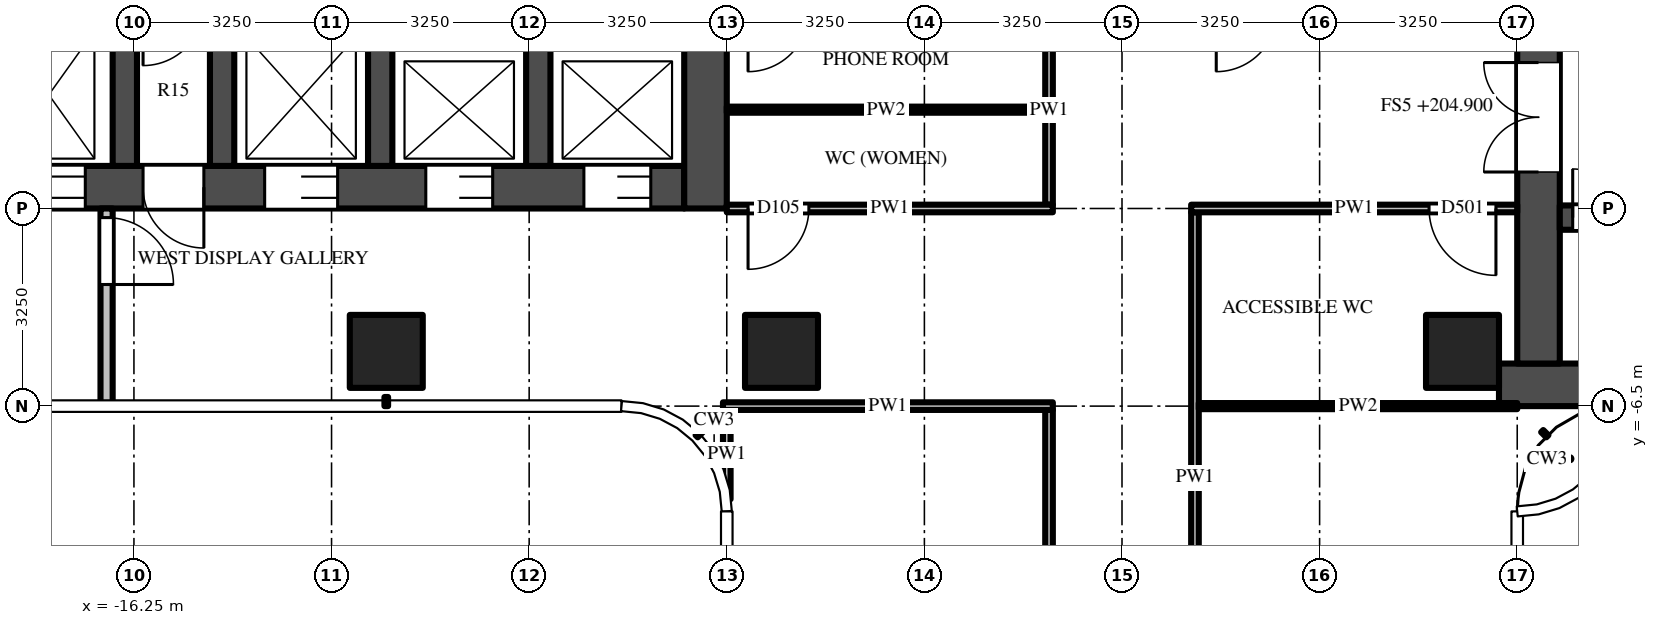
"""IFC4 building model, lengths in metres.
Left out: names, types, materials, properties, quantities, classifications, styles, units other than length and angle.
Written with IfcOpenShell. Run it as: python <this file> out.ifc"""

import sys

from ifc_helpers import new_model, si_unit, direction, frame, frame_2d, origin, origin_2d, place, context, subcontext, project, spatial, rectangle, extrude, source, transform, mapped, element, fill, save


model = new_model("IFC4")
c1 = context("Model", 3, precision=1e-05, world=origin(), true_north=direction((0.0, 1.0)))
c2 = subcontext(c1, "Body", "Model", "MODEL_VIEW")
j1 = project(units=[si_unit("LENGTHUNIT", "METRE"), si_unit("PLANEANGLEUNIT", "RADIAN")], contexts=[c1])
p1 = place(None, origin())
s1 = spatial("IfcSite", under=j1, at=p1, CompositionType="ELEMENT")
p2 = place(p1, origin())
s2 = spatial("IfcBuilding", under=s1, at=p2, CompositionType="ELEMENT")
p3 = place(p2, frame((0.0, 0.0, 204.9)))
s3 = spatial("IfcBuildingStorey", under=s2, at=p3, CompositionType="ELEMENT", Elevation=204.9)
m1 = source(origin(), c2, "Body", "SweptSolid", [
    extrude(rectangle(XDim=1.2, YDim=1.2, at=origin_2d()), origin(), (0.0, 0.0, 1.0), 3.9),
])
for number, where, z_axis, x_axis in (
    (1, (5.6, -5.6, 0.0), (0.0, 0.0, 1.0), (1.0, 0.0, 0.0)),
    (2, (-5.6, -5.6, 0.0), (0.0, 0.0, 1.0), (1.0, 0.0, 0.0)),
    (3, (-12.1, -5.6, 0.0), (0.0, 0.0, 1.0), (1.0, 0.0, 0.0)),
):
    element("IfcColumn", number, at=place(p3, frame(where, z_axis=z_axis, x_axis=x_axis)), inside=s3, PredefinedType="COLUMN", context=c2, shape_type="MappedRepresentation", body=[
        mapped(m1, transform((0.0, 0.0, 0.0))),
    ])
m2 = source(origin(), c2, "Body", "SweptSolid", [
    extrude(rectangle(XDim=16.55, YDim=0.7, at=frame_2d((8.275, 0.0))), origin(), (0.0, 0.0, 1.0), 3.7),
])
p4 = place(p3, frame((6.2, -6.15, 0.0), z_axis=(0.0, 0.0, 1.0), x_axis=(1.0, 0.0, 0.0)))
e4 = element("IfcWall", 4, at=p4, inside=s3, PredefinedType="SHEAR", context=c2, shape_type="MappedRepresentation", body=[
    mapped(m2, transform((0.0, 0.0, 0.0))),
])
m3 = source(origin(), c2, "Body", "SweptSolid", [
    extrude(rectangle(XDim=9.05, YDim=0.7, at=frame_2d((4.525, 0.0))), origin(), (0.0, 0.0, 1.0), 3.7),
])
p5 = place(p3, frame((6.85, -5.8, 0.0), z_axis=(0.0, 0.0, 1.0), x_axis=(0.0, 1.0, 0.0)))
e5 = element("IfcWall", 5, at=p5, inside=s3, PredefinedType="SHEAR", context=c2, shape_type="MappedRepresentation", body=[
    mapped(m3, transform((0.0, 0.0, 0.0))),
])
m4 = source(origin(), c2, "Body", "SweptSolid", [
    extrude(rectangle(XDim=1.8, YDim=2.1, at=frame_2d((0.9, 1.05))), frame((0.0, 0.36, 0.0), z_axis=(0.0, -1.0, 0.0), x_axis=(1.0, 0.0, 0.0)), (0.0, 0.0, 1.0), 0.72),
])
p6 = place(p5, frame((3.15, 0.0, 0.0)))
e6 = element("IfcOpeningElement", 6, at=p6, cuts=e5, PredefinedType="OPENING", context=c2, shape_type="MappedRepresentation", body=[
    mapped(m4, transform((0.0, 0.0, 0.0))),
])
m5 = source(origin(), c2, "Body", "SweptSolid", [
    extrude(rectangle(XDim=7.5, YDim=0.4, at=frame_2d((3.75, 0.0))), origin(), (0.0, 0.0, 1.0), 3.7),
])
p7 = place(p3, frame((7.2, -3.4, 0.0), z_axis=(0.0, 0.0, 1.0), x_axis=(1.0, 0.0, 0.0)))
e7 = element("IfcWall", 7, at=p7, inside=s3, PredefinedType="SHEAR", context=c2, shape_type="MappedRepresentation", body=[
    mapped(m5, transform((0.0, 0.0, 0.0))),
])
m6 = source(origin(), c2, "Body", "SweptSolid", [
    extrude(rectangle(XDim=0.8, YDim=2.1, at=frame_2d((0.4, 1.05))), frame((0.0, 0.21, 0.0), z_axis=(0.0, -1.0, 0.0), x_axis=(1.0, 0.0, 0.0)), (0.0, 0.0, 1.0), 0.42),
])
p8 = place(p7, frame((0.212, 0.0, 0.0)))
e8 = element("IfcOpeningElement", 8, at=p8, cuts=e7, PredefinedType="OPENING", context=c2, shape_type="MappedRepresentation", body=[
    mapped(m6, transform((0.0, 0.0, 0.0))),
])
m7 = source(origin(), c2, "Body", "SweptSolid", [
    extrude(rectangle(XDim=1.0, YDim=2.1, at=frame_2d((0.5, 1.05))), frame((0.0, 0.21, 0.0), z_axis=(0.0, -1.0, 0.0), x_axis=(1.0, 0.0, 0.0)), (0.0, 0.0, 1.0), 0.42),
])
p9 = place(p7, frame((3.05, 0.0, 0.0)))
e9 = element("IfcOpeningElement", 9, at=p9, cuts=e7, PredefinedType="OPENING", context=c2, shape_type="MappedRepresentation", body=[
    mapped(m7, transform((0.0, 0.0, 0.0))),
])
p10 = place(p7, frame((6.087, 0.0, 0.0)))
e10 = element("IfcOpeningElement", 10, at=p10, cuts=e7, PredefinedType="OPENING", context=c2, shape_type="MappedRepresentation", body=[
    mapped(m6, transform((0.0, 0.0, 0.0))),
])
m8 = source(origin(), c2, "Body", "SweptSolid", [
    extrude(rectangle(XDim=14.85, YDim=0.7, at=frame_2d((7.425, 0.0))), origin(), (0.0, 0.0, 1.0), 3.7),
])
p11 = place(p3, frame((-7.2, -2.9, 0.0), z_axis=(0.0, 0.0, 1.0), x_axis=(-1.0, 0.0, 0.0)))
e11 = element("IfcWall", 11, at=p11, inside=s3, PredefinedType="SHEAR", context=c2, shape_type="MappedRepresentation", body=[
    mapped(m8, transform((0.0, 0.0, 0.0))),
])
m9 = source(origin(), c2, "Body", "SweptSolid", [
    extrude(rectangle(XDim=1.1, YDim=2.1, at=frame_2d((0.55, 1.05))), frame((0.0, 0.36, 0.0), z_axis=(0.0, -1.0, 0.0), x_axis=(1.0, 0.0, 0.0)), (0.0, 0.0, 1.0), 0.72),
])
p12 = place(p11, frame((0.55, 0.0, 0.0)))
e12 = element("IfcOpeningElement", 12, at=p12, cuts=e11, PredefinedType="OPENING", context=c2, shape_type="MappedRepresentation", body=[
    mapped(m9, transform((0.0, 0.0, 0.0))),
])
p13 = place(p11, frame((3.15, 0.0, 0.0)))
e13 = element("IfcOpeningElement", 13, at=p13, cuts=e11, PredefinedType="OPENING", context=c2, shape_type="MappedRepresentation", body=[
    mapped(m9, transform((0.0, 0.0, 0.0))),
])
m10 = source(origin(), c2, "Body", "SweptSolid", [
    extrude(rectangle(XDim=1.2, YDim=2.1, at=frame_2d((0.6, 1.05))), frame((0.0, 0.36, 0.0), z_axis=(0.0, -1.0, 0.0), x_axis=(1.0, 0.0, 0.0)), (0.0, 0.0, 1.0), 0.72),
])
p14 = place(p11, frame((5.7, 0.0, 0.0)))
e14 = element("IfcOpeningElement", 14, at=p14, cuts=e11, PredefinedType="OPENING", context=c2, shape_type="MappedRepresentation", body=[
    mapped(m10, transform((0.0, 0.0, 0.0))),
])
m11 = source(origin(), c2, "Body", "SweptSolid", [
    extrude(rectangle(XDim=1.3, YDim=2.1, at=frame_2d((0.65, 1.05))), frame((0.0, 0.36, 0.0), z_axis=(0.0, -1.0, 0.0), x_axis=(1.0, 0.0, 0.0)), (0.0, 0.0, 1.0), 0.72),
])
p15 = place(p11, frame((12.2, 0.0, 0.0)))
e15 = element("IfcOpeningElement", 15, at=p15, cuts=e11, PredefinedType="OPENING", context=c2, shape_type="MappedRepresentation", body=[
    mapped(m11, transform((0.0, 0.0, 0.0))),
])
p16 = place(p11, frame((9.85, 0.0, 0.0)))
e16 = element("IfcOpeningElement", 16, at=p16, cuts=e11, PredefinedType="OPENING", context=c2, shape_type="MappedRepresentation", body=[
    mapped(m10, transform((0.0, 0.0, 0.0))),
])
m12 = source(origin(), c2, "Body", "SweptSolid", [
    extrude(rectangle(XDim=1.0, YDim=2.1, at=frame_2d((0.5, 1.05))), frame((0.0, 0.36, 0.0), z_axis=(0.0, -1.0, 0.0), x_axis=(1.0, 0.0, 0.0)), (0.0, 0.0, 1.0), 0.72),
])
p17 = place(p11, frame((7.9, 0.0, 0.0)))
e17 = element("IfcOpeningElement", 17, at=p17, cuts=e11, PredefinedType="OPENING", context=c2, shape_type="MappedRepresentation", body=[
    mapped(m12, transform((0.0, 0.0, 0.0))),
])
p18 = place(p3, frame((-6.85, 5.8, 0.0), z_axis=(0.0, 0.0, 1.0), x_axis=(0.0, -1.0, 0.0)))
e18 = element("IfcWall", 18, at=p18, inside=s3, PredefinedType="SHEAR", context=c2, shape_type="MappedRepresentation", body=[
    mapped(m3, transform((0.0, 0.0, 0.0))),
])
p19 = place(p18, frame((3.15, 0.0, 0.0)))
e19 = element("IfcOpeningElement", 19, at=p19, cuts=e18, PredefinedType="OPENING", context=c2, shape_type="MappedRepresentation", body=[
    mapped(m4, transform((0.0, 0.0, 0.0))),
])
m13 = source(origin(), c2, "Body", "SweptSolid", [
    extrude(rectangle(XDim=2.45, YDim=0.4, at=frame_2d((1.225, 0.0))), origin(), (0.0, 0.0, 1.0), 3.7),
])
for number, where, z_axis, x_axis in (
    (20, (-9.6, -0.1, 0.0), (0.0, 0.0, 1.0), (0.0, -1.0, 0.0)),
    (21, (-12.2, -0.1, 0.0), (0.0, 0.0, 1.0), (0.0, -1.0, 0.0)),
    (22, (-14.8, -0.1, 0.0), (0.0, 0.0, 1.0), (0.0, -1.0, 0.0)),
    (23, (-16.4, -0.1, 0.0), (0.0, 0.0, 1.0), (0.0, -1.0, 0.0)),
):
    element("IfcWall", number, at=place(p3, frame(where, z_axis=z_axis, x_axis=x_axis)), inside=s3, PredefinedType="SHEAR", context=c2, shape_type="MappedRepresentation", body=[
        mapped(m13, transform((0.0, 0.0, 0.0))),
    ])
m14 = source(origin(), c2, "Body", "SweptSolid", [
    extrude(rectangle(XDim=3.25, YDim=0.2, at=frame_2d((1.625, 0.0))), origin(), (0.0, 0.0, 1.0), 3.7),
])
p20 = place(p3, frame((-16.7, -3.25, 0.0), z_axis=(0.0, 0.0, 1.0), x_axis=(0.0, -1.0, 0.0)))
e24 = element("IfcWall", 24, at=p20, inside=s3, PredefinedType="PARTITIONING", context=c2, shape_type="MappedRepresentation", body=[
    mapped(m14, transform((0.0, 0.0, 0.0))),
])
m15 = source(origin(), c2, "Body", "SweptSolid", [
    extrude(rectangle(XDim=1.1, YDim=2.1, at=frame_2d((0.55, 1.05))), frame((0.0, 0.11, 0.0), z_axis=(0.0, -1.0, 0.0), x_axis=(1.0, 0.0, 0.0)), (0.0, 0.0, 1.0), 0.22),
])
p21 = place(p20, frame((0.15, 0.0, 0.0)))
e25 = element("IfcOpeningElement", 25, at=p21, cuts=e24, PredefinedType="OPENING", context=c2, shape_type="MappedRepresentation", body=[
    mapped(m15, transform((0.0, 0.0, 0.0))),
])
m16 = source(origin(), c2, "Body", "SweptSolid", [
    extrude(rectangle(XDim=1.469, YDim=0.125, at=frame_2d((0.734, 0.0))), origin(), (0.0, 0.0, 1.0), 3.7),
])
p22 = place(p3, frame((-6.5, -6.562, 0.0), z_axis=(0.0, 0.0, 1.0), x_axis=(0.0, -1.0, 0.0)))
e26 = element("IfcWall", 26, at=p22, inside=s3, PredefinedType="PARTITIONING", context=c2, shape_type="MappedRepresentation", body=[
    mapped(m16, transform((0.0, 0.0, 0.0))),
])
m17 = source(origin(), c2, "Body", "SweptSolid", [
    extrude(rectangle(XDim=3.125, YDim=0.125, at=frame_2d((1.562, 0.0))), origin(), (0.0, 0.0, 1.0), 3.068),
])
p23 = place(p3, frame((-1.2, -0.062, 0.0), z_axis=(0.0, 0.0, 1.0), x_axis=(0.0, -1.0, 0.0)))
e27 = element("IfcWall", 27, at=p23, inside=s3, PredefinedType="PARTITIONING", context=c2, shape_type="MappedRepresentation", body=[
    mapped(m17, transform((0.0, 0.0, 0.0))),
])
m18 = source(origin(), c2, "Body", "SweptSolid", [
    extrude(rectangle(XDim=5.475, YDim=0.125, at=frame_2d((2.738, 0.0))), origin(), (0.0, 0.0, 1.0), 2.997),
])
p24 = place(p3, frame((-1.2, -12.038, 0.0), z_axis=(0.0, 0.0, 1.0), x_axis=(0.0, 1.0, 0.0)))
e28 = element("IfcWall", 28, at=p24, inside=s3, PredefinedType="PARTITIONING", context=c2, shape_type="MappedRepresentation", body=[
    mapped(m18, transform((0.0, 0.0, 0.0))),
])
m19 = source(origin(), c2, "Body", "SweptSolid", [
    extrude(rectangle(XDim=1.2, YDim=2.1, at=frame_2d((0.6, 1.05))), frame((0.0, 0.073, 0.0), z_axis=(0.0, -1.0, 0.0), x_axis=(1.0, 0.0, 0.0)), (0.0, 0.0, 1.0), 0.145),
])
p25 = place(p24, frame((0.288, 0.0, 0.0)))
e29 = element("IfcOpeningElement", 29, at=p25, cuts=e28, PredefinedType="OPENING", context=c2, shape_type="MappedRepresentation", body=[
    mapped(m19, transform((0.0, 0.0, 0.0))),
])
m20 = source(origin(), c2, "Body", "SweptSolid", [
    extrude(rectangle(XDim=8.725, YDim=0.125, at=frame_2d((4.363, 0.0))), origin(), (0.0, 0.0, 1.0), 2.997),
])
p26 = place(p3, frame((1.2, -3.312, 0.0), z_axis=(0.0, 0.0, 1.0), x_axis=(0.0, -1.0, 0.0)))
e30 = element("IfcWall", 30, at=p26, inside=s3, PredefinedType="PARTITIONING", context=c2, shape_type="MappedRepresentation", body=[
    mapped(m20, transform((0.0, 0.0, 0.0))),
])
m21 = source(origin(), c2, "Body", "SweptSolid", [
    extrude(rectangle(XDim=1.0, YDim=2.1, at=frame_2d((0.5, 1.05))), frame((0.0, 0.073, 0.0), z_axis=(0.0, -1.0, 0.0), x_axis=(1.0, 0.0, 0.0)), (0.0, 0.0, 1.0), 0.145),
])
p27 = place(p26, frame((7.438, 0.0, 0.0)))
e31 = element("IfcOpeningElement", 31, at=p27, cuts=e30, PredefinedType="OPENING", context=c2, shape_type="MappedRepresentation", body=[
    mapped(m21, transform((0.0, 0.0, 0.0))),
])
m22 = source(origin(), c2, "Body", "SweptSolid", [
    extrude(rectangle(XDim=5.238, YDim=0.1, at=frame_2d((2.619, 0.0))), origin(), (0.0, 0.0, 1.0), 2.78),
])
p28 = place(p3, frame((1.262, -6.5, 0.0), z_axis=(0.0, 0.0, 1.0), x_axis=(1.0, 0.0, 0.0)))
e32 = element("IfcWall", 32, at=p28, inside=s3, PredefinedType="PARTITIONING", context=c2, shape_type="MappedRepresentation", body=[
    mapped(m22, transform((0.0, 0.0, 0.0))),
])
m23 = source(origin(), c2, "Body", "SweptSolid", [
    extrude(rectangle(XDim=5.425, YDim=0.125, at=frame_2d((2.712, 0.0))), origin(), (0.0, 0.0, 1.0), 2.78),
])
p29 = place(p3, frame((-1.137, -6.5, 0.0), z_axis=(0.0, 0.0, 1.0), x_axis=(-1.0, 0.0, 0.0)))
e33 = element("IfcWall", 33, at=p29, inside=s3, PredefinedType="PARTITIONING", context=c2, shape_type="MappedRepresentation", body=[
    mapped(m23, transform((0.0, 0.0, 0.0))),
])
m24 = source(origin(), c2, "Body", "SweptSolid", [
    extrude(rectangle(XDim=5.363, YDim=0.125, at=frame_2d((2.681, 0.0))), origin(), (0.0, 0.0, 1.0), 2.997),
])
p30 = place(p3, frame((-1.137, -3.25, 0.0), z_axis=(0.0, 0.0, 1.0), x_axis=(-1.0, 0.0, 0.0)))
e34 = element("IfcWall", 34, at=p30, inside=s3, PredefinedType="PARTITIONING", context=c2, shape_type="MappedRepresentation", body=[
    mapped(m24, transform((0.0, 0.0, 0.0))),
])
p31 = place(p30, frame((4.012, 0.0, 0.0)))
e35 = element("IfcOpeningElement", 35, at=p31, cuts=e34, PredefinedType="OPENING", context=c2, shape_type="MappedRepresentation", body=[
    mapped(m21, transform((0.0, 0.0, 0.0))),
])
p32 = place(p3, frame((6.5, -3.25, 0.0), z_axis=(0.0, 0.0, 1.0), x_axis=(-1.0, 0.0, 0.0)))
e36 = element("IfcWall", 36, at=p32, inside=s3, PredefinedType="PARTITIONING", context=c2, shape_type="MappedRepresentation", body=[
    mapped(m24, transform((0.0, 0.0, 0.0))),
])
m25 = source(origin(), c2, "Body", "SweptSolid", [
    extrude(rectangle(XDim=1.1, YDim=2.1, at=frame_2d((0.55, 1.05))), frame((0.0, 0.073, 0.0), z_axis=(0.0, -1.0, 0.0), x_axis=(1.0, 0.0, 0.0)), (0.0, 0.0, 1.0), 0.145),
])
p33 = place(p32, frame((0.35, 0.0, 0.0)))
e37 = element("IfcOpeningElement", 37, at=p33, cuts=e36, PredefinedType="OPENING", context=c2, shape_type="MappedRepresentation", body=[
    mapped(m25, transform((0.0, 0.0, 0.0))),
])
m26 = source(origin(), c2, "Body", "SweptSolid", [
    extrude(rectangle(XDim=5.238, YDim=0.1, at=frame_2d((2.619, 0.0))), origin(), (0.0, 0.0, 1.0), 2.997),
])
p34 = place(p3, frame((-6.5, -1.625, 0.0), z_axis=(0.0, 0.0, 1.0), x_axis=(1.0, 0.0, 0.0)))
e38 = element("IfcWall", 38, at=p34, inside=s3, PredefinedType="PARTITIONING", context=c2, shape_type="MappedRepresentation", body=[
    mapped(m26, transform((0.0, 0.0, 0.0))),
])
m27 = source(origin(), c2, "Body", "SweptSolid", [
    extrude(rectangle(XDim=1.8, YDim=2.1, at=frame_2d((0.9, 1.05))), frame((0.0, -0.275, 0.0), z_axis=(0.0, -1.0, 0.0), x_axis=(1.0, 0.0, 0.0)), (0.0, 0.0, 1.0), 0.05),
])
p35 = place(p6, origin())
e39 = element("IfcDoor", 39, at=p35, inside=s3, OperationType="DOUBLE_DOOR_SINGLE_SWING", PredefinedType="DOOR", context=c2, shape_type="MappedRepresentation", body=[
    mapped(m27, transform((0.0, 0.0, 0.0))),
])
fill(e6, e39)
m28 = source(origin(), c2, "Body", "SweptSolid", [
    extrude(rectangle(XDim=0.8, YDim=2.1, at=frame_2d((0.4, 1.05))), frame((0.0, 0.025, 0.0), z_axis=(0.0, -1.0, 0.0), x_axis=(1.0, 0.0, 0.0)), (0.0, 0.0, 1.0), 0.05),
])
p36 = place(p8, origin())
e40 = element("IfcDoor", 40, at=p36, inside=s3, OperationType="SINGLE_SWING_LEFT", PredefinedType="DOOR", context=c2, shape_type="MappedRepresentation", body=[
    mapped(m28, transform((0.0, 0.0, 0.0))),
])
fill(e8, e40)
m29 = source(origin(), c2, "Body", "SweptSolid", [
    extrude(rectangle(XDim=1.1, YDim=2.1, at=frame_2d((0.55, 1.05))), frame((0.0, -0.275, 0.0), z_axis=(0.0, -1.0, 0.0), x_axis=(1.0, 0.0, 0.0)), (0.0, 0.0, 1.0), 0.05),
])
p37 = place(p12, origin())
e41 = element("IfcDoor", 41, at=p37, inside=s3, OperationType="DOUBLE_DOOR_SLIDING", PredefinedType="DOOR", context=c2, shape_type="MappedRepresentation", body=[
    mapped(m29, transform((0.0, 0.0, 0.0))),
])
fill(e12, e41)
p38 = place(p13, origin())
e42 = element("IfcDoor", 42, at=p38, inside=s3, OperationType="DOUBLE_DOOR_SLIDING", PredefinedType="DOOR", context=c2, shape_type="MappedRepresentation", body=[
    mapped(m29, transform((0.0, 0.0, 0.0))),
])
fill(e13, e42)
m30 = source(origin(), c2, "Body", "SweptSolid", [
    extrude(rectangle(XDim=1.2, YDim=2.1, at=frame_2d((0.6, 1.05))), frame((0.0, -0.275, 0.0), z_axis=(0.0, -1.0, 0.0), x_axis=(1.0, 0.0, 0.0)), (0.0, 0.0, 1.0), 0.05),
])
p39 = place(p14, origin())
e43 = element("IfcDoor", 43, at=p39, inside=s3, OperationType="DOUBLE_DOOR_SLIDING", PredefinedType="DOOR", context=c2, shape_type="MappedRepresentation", body=[
    mapped(m30, transform((0.0, 0.0, 0.0))),
])
fill(e14, e43)
p40 = place(p16, origin())
e44 = element("IfcDoor", 44, at=p40, inside=s3, OperationType="DOUBLE_DOOR_SLIDING", PredefinedType="DOOR", context=c2, shape_type="MappedRepresentation", body=[
    mapped(m30, transform((0.0, 0.0, 0.0))),
])
fill(e16, e44)
m31 = source(origin(), c2, "Body", "SweptSolid", [
    extrude(rectangle(XDim=1.0, YDim=2.1, at=frame_2d((0.5, 1.05))), frame((0.0, -0.275, 0.0), z_axis=(0.0, -1.0, 0.0), x_axis=(1.0, 0.0, 0.0)), (0.0, 0.0, 1.0), 0.05),
])
p41 = place(p17, origin())
e45 = element("IfcDoor", 45, at=p41, inside=s3, OperationType="SINGLE_SWING_LEFT", PredefinedType="DOOR", context=c2, shape_type="MappedRepresentation", body=[
    mapped(m31, transform((0.0, 0.0, 0.0))),
])
fill(e17, e45)
m32 = source(origin(), c2, "Body", "SweptSolid", [
    extrude(rectangle(XDim=1.1, YDim=2.1, at=frame_2d((0.55, 1.05))), frame((0.0, 0.025, 0.0), z_axis=(0.0, -1.0, 0.0), x_axis=(1.0, 0.0, 0.0)), (0.0, 0.0, 1.0), 0.05),
])
p42 = place(p21, origin())
e46 = element("IfcDoor", 46, at=p42, inside=s3, OperationType="SINGLE_SWING_RIGHT", PredefinedType="DOOR", context=c2, shape_type="MappedRepresentation", body=[
    mapped(m32, transform((0.0, 0.0, 0.0))),
])
fill(e25, e46)
m33 = source(origin(), c2, "Body", "SweptSolid", [
    extrude(rectangle(XDim=1.0, YDim=2.1, at=frame_2d((0.5, 1.05))), frame((0.0, 0.025, 0.0), z_axis=(0.0, -1.0, 0.0), x_axis=(1.0, 0.0, 0.0)), (0.0, 0.0, 1.0), 0.05),
])
p43 = place(p31, origin())
e47 = element("IfcDoor", 47, at=p43, inside=s3, OperationType="SINGLE_SWING_RIGHT", PredefinedType="DOOR", context=c2, shape_type="MappedRepresentation", body=[
    mapped(m33, transform((0.0, 0.0, 0.0))),
])
fill(e35, e47)
p44 = place(p33, origin())
e48 = element("IfcDoor", 48, at=p44, inside=s3, OperationType="SINGLE_SWING_LEFT", PredefinedType="DOOR", context=c2, shape_type="MappedRepresentation", body=[
    mapped(m32, transform((0.0, 0.0, 0.0))),
])
fill(e37, e48)
save(model, sys.argv[1])
